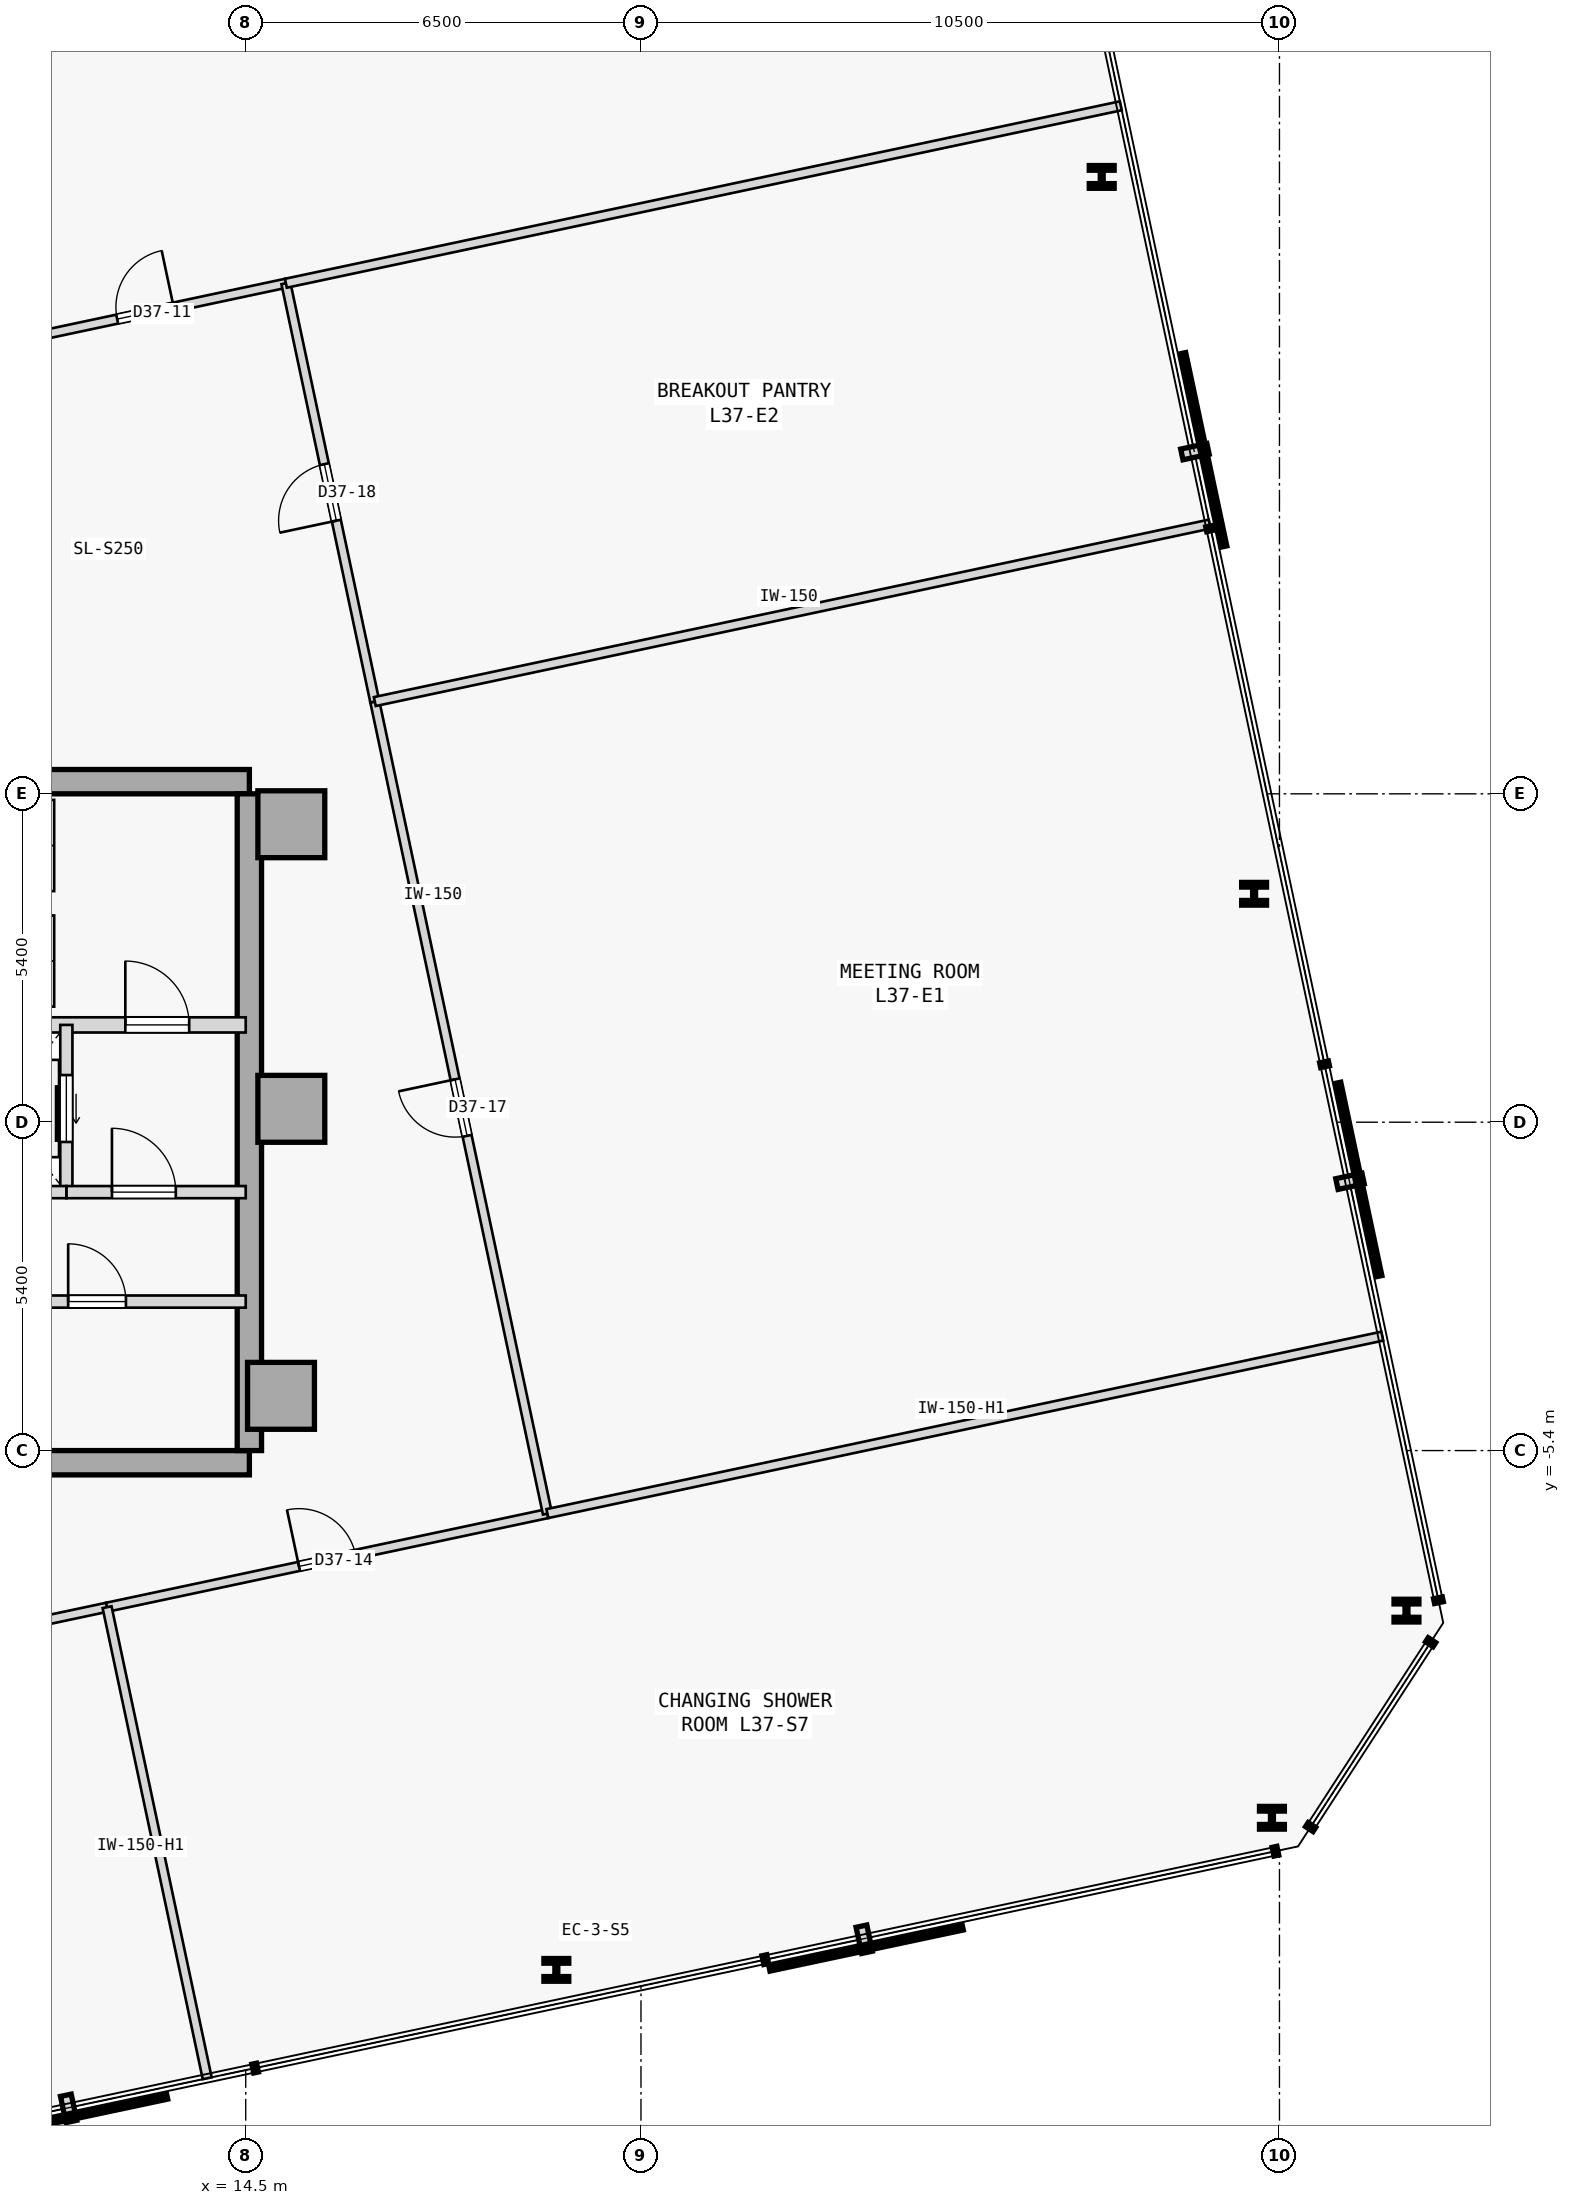
"""IFC4 building model, lengths in metres.
Left out: names, types, materials, properties, quantities, classifications, styles, units other than length and angle.
Written with IfcOpenShell. Run it as: python <this file> out.ifc"""

import sys

from ifc_helpers import new_model, si_unit, direction, frame, frame_2d, origin, origin_2d, place, context, subcontext, project, spatial, rectangle, i_section, extrude, element, fill, save


model = new_model("IFC4")
c1 = context("Model", 3, precision=1e-05, world=origin(), true_north=direction((0.0, 1.0)))
c2 = subcontext(c1, "Body", "Model", "MODEL_VIEW")
j1 = project(units=[si_unit("LENGTHUNIT", "METRE"), si_unit("PLANEANGLEUNIT", "RADIAN")], contexts=[c1])
p1 = place(None, origin())
s1 = spatial("IfcSite", under=j1, at=p1, CompositionType="ELEMENT")
p2 = place(p1, origin())
s2 = spatial("IfcBuilding", under=s1, at=p2, CompositionType="ELEMENT")
p3 = place(p2, frame((0.0, 0.0, 147.3)))
s3 = spatial("IfcBuildingStorey", under=s2, at=p3, CompositionType="ELEMENT", Elevation=147.3)
for number, where, z_axis, x_axis in (
    (1, (15.25, 4.9, 0.0), (0.0, 0.0, 1.0), (1.0, 0.0, 0.0)),
    (2, (15.25, 0.22, 0.0), (0.0, 0.0, 1.0), (1.0, 0.0, 0.0)),
    (3, (15.08, -4.5, 0.0), (0.0, 0.0, 1.0), (1.0, 0.0, 0.0)),
):
    element("IfcColumn", number, at=place(p3, frame(where, z_axis=z_axis, x_axis=x_axis)), inside=s3, PredefinedType="COLUMN", context=c2, shape_type="SweptSolid", body=[
        extrude(rectangle(XDim=1.1, YDim=1.1, at=origin_2d()), origin(), (0.0, 0.0, 1.0), 4.1),
    ])
p4 = place(p3, frame((3.15, 5.6, 0.0), z_axis=(0.0, 0.0, 1.0), x_axis=(1.0, 0.0, 0.0)))
e4 = element("IfcWall", 4, at=p4, inside=s3, PredefinedType="SHEAR", context=c2, shape_type="SweptSolid", body=[
    extrude(rectangle(XDim=11.41, YDim=0.4, at=frame_2d((5.705, 0.0))), origin(), (0.0, 0.0, 1.0), 3.875),
])
p5 = place(p3, frame((3.7, -5.6, 0.0), z_axis=(0.0, 0.0, 1.0), x_axis=(1.0, 0.0, 0.0)))
e5 = element("IfcWall", 5, at=p5, inside=s3, PredefinedType="SHEAR", context=c2, shape_type="SweptSolid", body=[
    extrude(rectangle(XDim=10.86, YDim=0.4, at=frame_2d((5.43, 0.0))), origin(), (0.0, 0.0, 1.0), 3.875),
])
p6 = place(p3, frame((14.56, -5.4, 0.0), z_axis=(0.0, 0.0, 1.0), x_axis=(0.0, 1.0, 0.0)))
e6 = element("IfcWall", 6, at=p6, inside=s3, PredefinedType="SHEAR", context=c2, shape_type="SweptSolid", body=[
    extrude(rectangle(XDim=10.8, YDim=0.4, at=frame_2d((5.4, 0.0))), origin(), (0.0, 0.0, 1.0), 3.875),
])
for number, where, z_axis, x_axis in (
    (7, (19.608, -13.94, 0.0), (0.0, 0.0, 1.0), (1.0, 0.0, 0.0)),
    (8, (31.376, -11.439, 0.0), (0.0, 0.0, 1.0), (1.0, 0.0, 0.0)),
    (9, (33.589, -8.032, 0.0), (0.0, 0.0, 1.0), (1.0, 0.0, 0.0)),
    (10, (31.083, 3.756, 0.0), (0.0, 0.0, 1.0), (1.0, 0.0, 0.0)),
    (11, (28.577, 15.545, 0.0), (0.0, 0.0, 1.0), (1.0, 0.0, 0.0)),
):
    element("IfcColumn", number, at=place(p3, frame(where, z_axis=z_axis, x_axis=x_axis)), inside=s3, PredefinedType="COLUMN", context=c2, shape_type="SweptSolid", body=[
        extrude(i_section(OverallWidth=0.409, OverallDepth=0.374, WebThickness=0.048, FlangeThickness=0.077, FilletRadius=0.015, at=origin_2d()), origin(), (0.0, 0.0, 1.0), 4.1),
    ])
p7 = place(p3, frame((10.9, 1.6, 0.0), z_axis=(0.0, 0.0, 1.0), x_axis=(1.0, 0.0, 0.0)))
e12 = element("IfcWall", 12, at=p7, inside=s3, PredefinedType="STANDARD", context=c2, shape_type="SweptSolid", body=[
    extrude(rectangle(XDim=3.6, YDim=0.25, at=frame_2d((1.8, 0.0))), origin(), (0.0, 0.0, 1.0), 3.875),
])
p8 = place(p7, frame((1.62, 0.0, 0.0)))
e13 = element("IfcOpeningElement", 13, at=p8, cuts=e12, PredefinedType="OPENING", context=c2, shape_type="SweptSolid", body=[
    extrude(rectangle(XDim=1.05, YDim=2.15, at=frame_2d((0.525, 1.075))), frame((0.0, 0.135, 0.0), z_axis=(0.0, -1.0, 0.0), x_axis=(1.0, 0.0, 0.0)), (0.0, 0.0, 1.0), 0.27),
])
p9 = place(p3, frame((11.55, -1.15, 0.0), z_axis=(0.0, 0.0, 1.0), x_axis=(0.0, 1.0, 0.0)))
e14 = element("IfcWall", 14, at=p9, inside=s3, PredefinedType="STANDARD", context=c2, shape_type="SweptSolid", body=[
    extrude(rectangle(XDim=2.75, YDim=0.2, at=frame_2d((1.375, 0.0))), origin(), (0.0, 0.0, 1.0), 3.875),
])
p10 = place(p9, frame((0.825, 0.0, 0.0)))
e15 = element("IfcOpeningElement", 15, at=p10, cuts=e14, PredefinedType="OPENING", context=c2, shape_type="SweptSolid", body=[
    extrude(rectangle(XDim=1.1, YDim=2.15, at=frame_2d((0.55, 1.075))), frame((0.0, 0.11, 0.0), z_axis=(0.0, -1.0, 0.0), x_axis=(1.0, 0.0, 0.0)), (0.0, 0.0, 1.0), 0.22),
])
p11 = place(p3, frame((11.55, -1.15, 0.0), z_axis=(0.0, 0.0, 1.0), x_axis=(1.0, 0.0, 0.0)))
e16 = element("IfcWall", 16, at=p11, inside=s3, PredefinedType="STANDARD", context=c2, shape_type="SweptSolid", body=[
    extrude(rectangle(XDim=2.95, YDim=0.2, at=frame_2d((1.475, 0.0))), origin(), (0.0, 0.0, 1.0), 3.875),
])
p12 = place(p11, frame((0.75, 0.0, 0.0)))
e17 = element("IfcOpeningElement", 17, at=p12, cuts=e16, PredefinedType="OPENING", context=c2, shape_type="SweptSolid", body=[
    extrude(rectangle(XDim=1.05, YDim=2.18, at=frame_2d((0.525, 1.09))), frame((0.0, 0.11, 0.0), z_axis=(0.0, -1.0, 0.0), x_axis=(1.0, 0.0, 0.0)), (0.0, 0.0, 1.0), 0.22),
])
p13 = place(p3, frame((9.35, -1.15, 0.0), z_axis=(0.0, 0.0, 1.0), x_axis=(1.0, 0.0, 0.0)))
e18 = element("IfcWall", 18, at=p13, inside=s3, PredefinedType="STANDARD", context=c2, shape_type="SweptSolid", body=[
    extrude(rectangle(XDim=2.2, YDim=0.2, at=frame_2d((1.1, 0.0))), origin(), (0.0, 0.0, 1.0), 3.875),
])
p14 = place(p3, frame((3.7, -2.95, 0.0), z_axis=(0.0, 0.0, 1.0), x_axis=(1.0, 0.0, 0.0)))
e19 = element("IfcWall", 19, at=p14, inside=s3, PredefinedType="STANDARD", context=c2, shape_type="SweptSolid", body=[
    extrude(rectangle(XDim=10.8, YDim=0.2, at=frame_2d((5.4, 0.0))), origin(), (0.0, 0.0, 1.0), 3.875),
])
p15 = place(p14, frame((2.69, 0.0, 0.0)))
e20 = element("IfcOpeningElement", 20, at=p15, cuts=e19, PredefinedType="OPENING", context=c2, shape_type="SweptSolid", body=[
    extrude(rectangle(XDim=1.1, YDim=2.15, at=frame_2d((0.55, 1.075))), frame((0.0, 0.11, 0.0), z_axis=(0.0, -1.0, 0.0), x_axis=(1.0, 0.0, 0.0)), (0.0, 0.0, 1.0), 0.22),
])
p16 = place(p14, frame((4.85, 0.0, 0.0)))
e21 = element("IfcOpeningElement", 21, at=p16, cuts=e19, PredefinedType="OPENING", context=c2, shape_type="SweptSolid", body=[
    extrude(rectangle(XDim=1.1, YDim=2.15, at=frame_2d((0.55, 1.075))), frame((0.0, 0.11, 0.0), z_axis=(0.0, -1.0, 0.0), x_axis=(1.0, 0.0, 0.0)), (0.0, 0.0, 1.0), 0.22),
])
p17 = place(p14, frame((7.88, 0.0, 0.0)))
e22 = element("IfcOpeningElement", 22, at=p17, cuts=e19, PredefinedType="OPENING", context=c2, shape_type="SweptSolid", body=[
    extrude(rectangle(XDim=0.95, YDim=2.15, at=frame_2d((0.475, 1.075))), frame((0.0, 0.11, 0.0), z_axis=(0.0, -1.0, 0.0), x_axis=(1.0, 0.0, 0.0)), (0.0, 0.0, 1.0), 0.22),
])
p18 = place(p3, frame((10.541, 12.814, 0.0), z_axis=(0.0, 0.0, 1.0), x_axis=(0.978147550902, 0.207911925258, 0.0)))
e23 = element("IfcWall", 23, at=p18, inside=s3, PredefinedType="PARTITIONING", context=c2, shape_type="SweptSolid", body=[
    extrude(rectangle(XDim=4.723, YDim=0.15, at=frame_2d((2.361, 0.0))), origin(), (0.0, 0.0, 1.0), 3.875),
])
p19 = place(p18, frame((1.886, 0.0, 0.0)))
e24 = element("IfcOpeningElement", 24, at=p19, cuts=e23, PredefinedType="OPENING", context=c2, shape_type="SweptSolid", body=[
    extrude(rectangle(XDim=0.95, YDim=2.15, at=frame_2d((0.475, 1.075))), frame((0.0, 0.085, 0.0), z_axis=(0.0, -1.0, 0.0), x_axis=(1.0, 0.0, 0.0)), (0.0, 0.0, 1.0), 0.17),
])
p20 = place(p3, frame((-10.062, -12.712, 0.0), z_axis=(0.0, 0.0, 1.0), x_axis=(0.978146755646, 0.207915666603, 0.0)))
e25 = element("IfcWall", 25, at=p20, inside=s3, PredefinedType="PARTITIONING", context=c2, shape_type="SweptSolid", body=[
    extrude(rectangle(XDim=22.78, YDim=0.15, at=frame_2d((11.39, 0.0))), origin(), (0.0, 0.0, 1.0), 3.875),
])
p21 = place(p20, frame((10.915, 0.0, 0.0)))
e26 = element("IfcOpeningElement", 26, at=p21, cuts=e25, PredefinedType="OPENING", context=c2, shape_type="SweptSolid", body=[
    extrude(rectangle(XDim=0.95, YDim=2.15, at=frame_2d((0.475, 1.075))), frame((0.0, 0.085, 0.0), z_axis=(0.0, -1.0, 0.0), x_axis=(1.0, 0.0, 0.0)), (0.0, 0.0, 1.0), 0.17),
])
p22 = place(p3, frame((12.22, -7.976, 0.0), z_axis=(0.0, 0.0, 1.0), x_axis=(0.978150468613, 0.207898198049, 0.0)))
e27 = element("IfcWall", 27, at=p22, inside=s3, PredefinedType="PARTITIONING", context=c2, shape_type="SweptSolid", body=[
    extrude(rectangle(XDim=7.403, YDim=0.15, at=frame_2d((3.702, 0.0))), origin(), (0.0, 0.0, 1.0), 3.875),
])
p23 = place(p22, frame((3.227, 0.0, 0.0)))
e28 = element("IfcOpeningElement", 28, at=p23, cuts=e27, PredefinedType="OPENING", context=c2, shape_type="SweptSolid", body=[
    extrude(rectangle(XDim=0.95, YDim=2.15, at=frame_2d((0.475, 1.075))), frame((0.0, 0.085, 0.0), z_axis=(0.0, -1.0, 0.0), x_axis=(1.0, 0.0, 0.0)), (0.0, 0.0, 1.0), 0.17),
])
p24 = place(p3, frame((19.461, -6.437, 0.0), z_axis=(0.0, 0.0, 1.0), x_axis=(-0.207908161816, 0.97814835084, 0.0)))
e29 = element("IfcWall", 29, at=p24, inside=s3, PredefinedType="PARTITIONING", context=c2, shape_type="SweptSolid", body=[
    extrude(rectangle(XDim=13.652, YDim=0.15, at=frame_2d((6.826, 0.0))), origin(), (0.0, 0.0, 1.0), 3.875),
])
p25 = place(p24, frame((6.351, 0.0, 0.0)))
e30 = element("IfcOpeningElement", 30, at=p25, cuts=e29, PredefinedType="OPENING", context=c2, shape_type="SweptSolid", body=[
    extrude(rectangle(XDim=0.95, YDim=2.15, at=frame_2d((0.475, 1.075))), frame((0.0, 0.085, 0.0), z_axis=(0.0, -1.0, 0.0), x_axis=(1.0, 0.0, 0.0)), (0.0, 0.0, 1.0), 0.17),
])
p26 = place(p3, frame((16.623, 6.917, 0.0), z_axis=(0.0, 0.0, 1.0), x_axis=(-0.207930994041, 0.978143497508, 0.0)))
e31 = element("IfcWall", 31, at=p26, inside=s3, PredefinedType="PARTITIONING", context=c2, shape_type="SweptSolid", body=[
    extrude(rectangle(XDim=7.033, YDim=0.15, at=frame_2d((3.517, 0.0))), origin(), (0.0, 0.0, 1.0), 3.875),
])
p27 = place(p26, frame((3.042, 0.0, 0.0)))
e32 = element("IfcOpeningElement", 32, at=p27, cuts=e31, PredefinedType="OPENING", context=c2, shape_type="SweptSolid", body=[
    extrude(rectangle(XDim=0.95, YDim=2.15, at=frame_2d((0.475, 1.075))), frame((0.0, 0.085, 0.0), z_axis=(0.0, -1.0, 0.0), x_axis=(1.0, 0.0, 0.0)), (0.0, 0.0, 1.0), 0.17),
])
p28 = place(p3, frame((15.16, 13.796, 0.0), z_axis=(0.0, 0.0, 1.0), x_axis=(0.978147489214, 0.207912215474, 0.0)))
e33 = element("IfcWall", 33, at=p28, inside=s3, PredefinedType="PARTITIONING", context=c2, shape_type="SweptSolid", body=[
    extrude(rectangle(XDim=14.037, YDim=0.15, at=frame_2d((7.019, 0.0))), origin(), (0.0, 0.0, 1.0), 3.875),
])
p29 = place(p3, frame((13.867, -15.723, 0.0), z_axis=(0.0, 0.0, 1.0), x_axis=(-0.207916267651, 0.978146627887, 0.0)))
e34 = element("IfcWall", 34, at=p29, inside=s3, PredefinedType="PARTITIONING", context=c2, shape_type="SweptSolid", body=[
    extrude(rectangle(XDim=7.92, YDim=0.15, at=frame_2d((3.96, 0.0))), origin(), (0.0, 0.0, 1.0), 3.425),
])
p30 = place(p3, frame((19.461, -6.437, 0.0), z_axis=(0.0, 0.0, 1.0), x_axis=(0.978147489214, 0.207912215474, 0.0)))
e35 = element("IfcWall", 35, at=p30, inside=s3, PredefinedType="PARTITIONING", context=c2, shape_type="SweptSolid", body=[
    extrude(rectangle(XDim=14.037, YDim=0.15, at=frame_2d((7.019, 0.0))), origin(), (0.0, 0.0, 1.0), 3.425),
])
p31 = place(p3, frame((16.623, 6.917, 0.0), z_axis=(0.0, 0.0, 1.0), x_axis=(0.978147489214, 0.207912215474, 0.0)))
e36 = element("IfcWall", 36, at=p31, inside=s3, PredefinedType="PARTITIONING", context=c2, shape_type="SweptSolid", body=[
    extrude(rectangle(XDim=14.037, YDim=0.15, at=frame_2d((7.019, 0.0))), origin(), (0.0, 0.0, 1.0), 3.875),
])
p32 = place(p8, origin())
e37 = element("IfcDoor", 37, at=p32, inside=s3, OperationType="SINGLE_SWING_LEFT", PredefinedType="DOOR", context=c2, shape_type="SweptSolid", body=[
    extrude(rectangle(XDim=1.05, YDim=2.15, at=frame_2d((0.525, 1.075))), frame((0.0, 0.025, 0.0), z_axis=(0.0, -1.0, 0.0), x_axis=(1.0, 0.0, 0.0)), (0.0, 0.0, 1.0), 0.05),
])
fill(e13, e37)
p33 = place(p12, origin())
e38 = element("IfcDoor", 38, at=p33, inside=s3, OperationType="SINGLE_SWING_LEFT", PredefinedType="DOOR", context=c2, shape_type="SweptSolid", body=[
    extrude(rectangle(XDim=1.05, YDim=2.18, at=frame_2d((0.525, 1.09))), frame((0.0, 0.025, 0.0), z_axis=(0.0, -1.0, 0.0), x_axis=(1.0, 0.0, 0.0)), (0.0, 0.0, 1.0), 0.05),
])
fill(e17, e38)
p34 = place(p10, origin())
e39 = element("IfcDoor", 39, at=p34, inside=s3, OperationType="SLIDING_TO_RIGHT", PredefinedType="DOOR", context=c2, shape_type="SweptSolid", body=[
    extrude(rectangle(XDim=1.1, YDim=2.15, at=frame_2d((0.55, 1.075))), frame((0.0, 0.025, 0.0), z_axis=(0.0, -1.0, 0.0), x_axis=(1.0, 0.0, 0.0)), (0.0, 0.0, 1.0), 0.05),
])
fill(e15, e39)
p35 = place(p17, origin())
e40 = element("IfcDoor", 40, at=p35, inside=s3, OperationType="SINGLE_SWING_LEFT", PredefinedType="DOOR", context=c2, shape_type="SweptSolid", body=[
    extrude(rectangle(XDim=0.95, YDim=2.15, at=frame_2d((0.475, 1.075))), frame((0.0, 0.025, 0.0), z_axis=(0.0, -1.0, 0.0), x_axis=(1.0, 0.0, 0.0)), (0.0, 0.0, 1.0), 0.05),
])
fill(e22, e40)
p36 = place(p19, origin())
e41 = element("IfcDoor", 41, at=p36, inside=s3, OperationType="SINGLE_SWING_RIGHT", PredefinedType="DOOR", context=c2, shape_type="SweptSolid", body=[
    extrude(rectangle(XDim=0.95, YDim=2.15, at=frame_2d((0.475, 1.075))), frame((0.0, 0.025, 0.0), z_axis=(0.0, -1.0, 0.0), x_axis=(1.0, 0.0, 0.0)), (0.0, 0.0, 1.0), 0.05),
])
fill(e24, e41)
p37 = place(p23, origin())
e42 = element("IfcDoor", 42, at=p37, inside=s3, OperationType="SINGLE_SWING_LEFT", PredefinedType="DOOR", context=c2, shape_type="SweptSolid", body=[
    extrude(rectangle(XDim=0.95, YDim=2.15, at=frame_2d((0.475, 1.075))), frame((0.0, 0.025, 0.0), z_axis=(0.0, -1.0, 0.0), x_axis=(1.0, 0.0, 0.0)), (0.0, 0.0, 1.0), 0.05),
])
fill(e28, e42)
p38 = place(p25, origin())
e43 = element("IfcDoor", 43, at=p38, inside=s3, OperationType="SINGLE_SWING_RIGHT", PredefinedType="DOOR", context=c2, shape_type="SweptSolid", body=[
    extrude(rectangle(XDim=0.95, YDim=2.15, at=frame_2d((0.475, 1.075))), frame((0.0, 0.025, 0.0), z_axis=(0.0, -1.0, 0.0), x_axis=(1.0, 0.0, 0.0)), (0.0, 0.0, 1.0), 0.05),
])
fill(e30, e43)
p39 = place(p27, origin())
e44 = element("IfcDoor", 44, at=p39, inside=s3, OperationType="SINGLE_SWING_LEFT", PredefinedType="DOOR", context=c2, shape_type="SweptSolid", body=[
    extrude(rectangle(XDim=0.95, YDim=2.15, at=frame_2d((0.475, 1.075))), frame((0.0, 0.025, 0.0), z_axis=(0.0, -1.0, 0.0), x_axis=(1.0, 0.0, 0.0)), (0.0, 0.0, 1.0), 0.05),
])
fill(e32, e44)
save(model, sys.argv[1])
